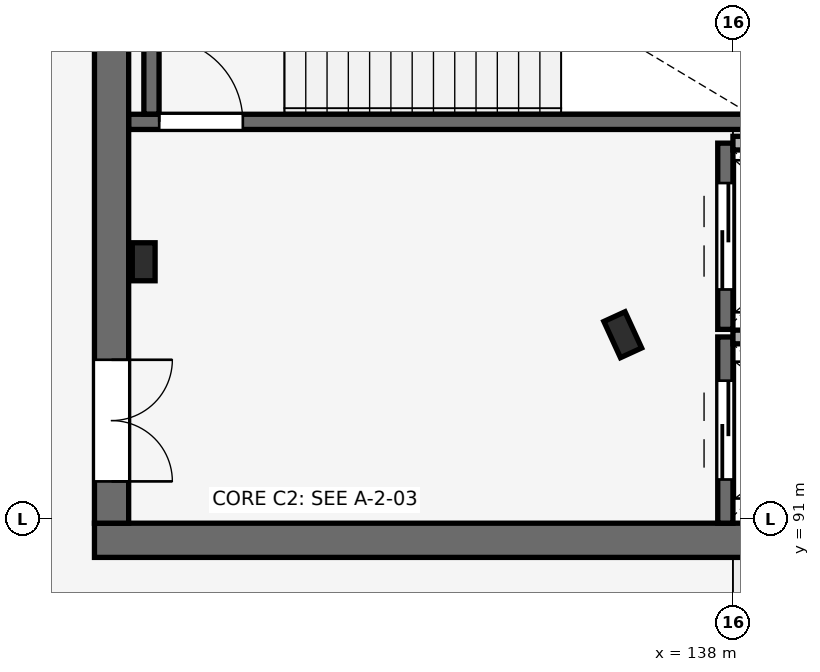
"""IFC4 building model, lengths in metres.
Left out: names, types, materials, properties, quantities, classifications, styles, units other than length and angle.
Written with IfcOpenShell. Run it as: python <this file> out.ifc"""

import sys

from ifc_helpers import new_model, si_unit, direction, frame, frame_2d, origin, origin_2d, place, context, subcontext, project, spatial, rectangle, i_section, extrude, element, fill, save


model = new_model("IFC4")
c1 = context("Model", 3, precision=1e-05, world=origin(), true_north=direction((0.0, 1.0)))
c2 = subcontext(c1, "Body", "Model", "MODEL_VIEW")
j1 = project(units=[si_unit("LENGTHUNIT", "METRE"), si_unit("PLANEANGLEUNIT", "RADIAN")], contexts=[c1])
p1 = place(None, origin())
s1 = spatial("IfcSite", under=j1, at=p1, CompositionType="ELEMENT")
p2 = place(p1, origin())
s2 = spatial("IfcBuilding", under=s1, at=p2, CompositionType="ELEMENT")
p3 = place(p2, frame((0.0, 0.0, 10.2)))
s3 = spatial("IfcBuildingStorey", under=s2, at=p3, CompositionType="ELEMENT", Elevation=10.2)
p4 = place(p3, frame((136.55, 93.43, 0.0), z_axis=(0.0, 0.0, 1.0), x_axis=(0.909018020308, 0.416756810089, 0.0)))
e1 = element("IfcColumn", 1, at=p4, inside=s3, PredefinedType="COLUMN", context=c2, shape_type="SweptSolid", body=[
    extrude(i_section(OverallWidth=0.306, OverallDepth=0.524, WebThickness=0.021, FlangeThickness=0.04, FilletRadius=0.027, at=origin_2d()), origin(), (0.0, 0.0, 1.0), 4.8),
])
p5 = place(p3, frame((129.6, 90.725, 0.0), z_axis=(0.0, 0.0, 1.0), x_axis=(1.0, 0.0, 0.0)))
e2 = element("IfcWall", 2, at=p5, inside=s3, PredefinedType="SHEAR", context=c2, shape_type="SweptSolid", body=[
    extrude(rectangle(XDim=11.4, YDim=0.45, at=frame_2d((5.7, 0.0))), origin(), (0.0, 0.0, 1.0), 4.8),
])
p6 = place(p3, frame((129.825, 90.95, 0.0), z_axis=(0.0, 0.0, 1.0), x_axis=(0.0, 1.0, 0.0)))
e3 = element("IfcWall", 3, at=p6, inside=s3, PredefinedType="SHEAR", context=c2, shape_type="SweptSolid", body=[
    extrude(rectangle(XDim=9.1, YDim=0.45, at=frame_2d((4.55, 0.0))), origin(), (0.0, 0.0, 1.0), 4.8),
])
p7 = place(p6, frame((0.55, 0.0, 0.0)))
e4 = element("IfcOpeningElement", 4, at=p7, cuts=e3, PredefinedType="OPENING", context=c2, shape_type="SweptSolid", body=[
    extrude(rectangle(XDim=1.6, YDim=2.2, at=frame_2d((0.8, 1.1))), frame((0.0, 0.235, 0.0), z_axis=(0.0, -1.0, 0.0), x_axis=(1.0, 0.0, 0.0)), (0.0, 0.0, 1.0), 0.47),
])
p8 = place(p3, frame((130.248, 94.389, 0.0), z_axis=(0.0, 0.0, 1.0), x_axis=(1.0, 0.0, 0.0)))
e5 = element("IfcColumn", 5, at=p8, inside=s3, PredefinedType="COLUMN", context=c2, shape_type="SweptSolid", body=[
    extrude(i_section(OverallWidth=0.3, OverallDepth=0.5, WebThickness=0.014, FlangeThickness=0.028, FilletRadius=0.027, at=origin_2d()), origin(), (0.0, 0.0, 1.0), 4.8),
])
p9 = place(p3, frame((137.9, 90.95, 0.0), z_axis=(0.0, 0.0, 1.0), x_axis=(0.0, 1.0, 0.0)))
e6 = element("IfcWall", 6, at=p9, inside=s3, PredefinedType="SHEAR", context=c2, shape_type="SweptSolid", body=[
    extrude(rectangle(XDim=2.45, YDim=0.2, at=frame_2d((1.225, 0.0))), origin(), (0.0, 0.0, 1.0), 4.52),
])
p10 = place(p9, frame((0.575, 0.0, 0.0)))
e7 = element("IfcOpeningElement", 7, at=p10, cuts=e6, PredefinedType="OPENING", context=c2, shape_type="SweptSolid", body=[
    extrude(rectangle(XDim=1.3, YDim=2.2, at=frame_2d((0.65, 1.1))), frame((0.0, 0.11, 0.0), z_axis=(0.0, -1.0, 0.0), x_axis=(1.0, 0.0, 0.0)), (0.0, 0.0, 1.0), 0.22),
])
p11 = place(p3, frame((138.0, 93.4, 0.0), z_axis=(0.0, 0.0, 1.0), x_axis=(1.0, 0.0, 0.0)))
e8 = element("IfcWall", 8, at=p11, inside=s3, PredefinedType="PARTITIONING", context=c2, shape_type="SweptSolid", body=[
    extrude(rectangle(XDim=2.45, YDim=0.18, at=frame_2d((1.225, 0.0))), origin(), (0.0, 0.0, 1.0), 4.8),
])
p12 = place(p3, frame((137.9, 93.5, 0.0), z_axis=(0.0, 0.0, 1.0), x_axis=(0.0, 1.0, 0.0)))
e9 = element("IfcWall", 9, at=p12, inside=s3, PredefinedType="SHEAR", context=c2, shape_type="SweptSolid", body=[
    extrude(rectangle(XDim=2.45, YDim=0.2, at=frame_2d((1.225, 0.0))), origin(), (0.0, 0.0, 1.0), 4.52),
])
p13 = place(p12, frame((0.525, 0.0, 0.0)))
e10 = element("IfcOpeningElement", 10, at=p13, cuts=e9, PredefinedType="OPENING", context=c2, shape_type="SweptSolid", body=[
    extrude(rectangle(XDim=1.4, YDim=2.2, at=frame_2d((0.7, 1.1))), frame((0.0, 0.11, 0.0), z_axis=(0.0, -1.0, 0.0), x_axis=(1.0, 0.0, 0.0)), (0.0, 0.0, 1.0), 0.22),
])
p14 = place(p3, frame((138.0, 95.95, 0.0), z_axis=(0.0, 0.0, 1.0), x_axis=(1.0, 0.0, 0.0)))
e11 = element("IfcWall", 11, at=p14, inside=s3, PredefinedType="PARTITIONING", context=c2, shape_type="SweptSolid", body=[
    extrude(rectangle(XDim=2.45, YDim=0.18, at=frame_2d((1.225, 0.0))), origin(), (0.0, 0.0, 1.0), 4.8),
])
p15 = place(p3, frame((130.052, 96.23, 0.0), z_axis=(0.0, 0.0, 1.0), x_axis=(1.0, 0.0, 0.0)))
e12 = element("IfcWall", 12, at=p15, inside=s3, PredefinedType="SHEAR", context=c2, shape_type="SweptSolid", body=[
    extrude(rectangle(XDim=8.248, YDim=0.2, at=frame_2d((4.124, 0.0))), origin(), (0.0, 0.0, 1.0), 4.8),
])
p16 = place(p15, frame((0.4, 0.0, 0.0)))
e13 = element("IfcOpeningElement", 13, at=p16, cuts=e12, PredefinedType="OPENING", context=c2, shape_type="SweptSolid", body=[
    extrude(rectangle(XDim=1.1, YDim=2.15, at=frame_2d((0.55, 1.075))), frame((0.0, 0.11, 0.0), z_axis=(0.0, -1.0, 0.0), x_axis=(1.0, 0.0, 0.0)), (0.0, 0.0, 1.0), 0.22),
])
p17 = place(p3, frame((130.35, 96.332, 0.0), z_axis=(0.0, 0.0, 1.0), x_axis=(0.0, 1.0, 0.0)))
e14 = element("IfcWall", 14, at=p17, inside=s3, PredefinedType="SHEAR", context=c2, shape_type="SweptSolid", body=[
    extrude(rectangle(XDim=3.686, YDim=0.2, at=frame_2d((1.843, 0.0))), origin(), (0.0, 0.0, 1.0), 4.8),
])
p18 = place(p10, origin())
e15 = element("IfcDoor", 15, at=p18, inside=s3, OperationType="DOUBLE_DOOR_SLIDING", PredefinedType="DOOR", context=c2, shape_type="SweptSolid", body=[
    extrude(rectangle(XDim=1.3, YDim=2.2, at=frame_2d((0.65, 1.1))), frame((0.0, 0.025, 0.0), z_axis=(0.0, -1.0, 0.0), x_axis=(1.0, 0.0, 0.0)), (0.0, 0.0, 1.0), 0.05),
])
fill(e7, e15)
p19 = place(p13, origin())
e16 = element("IfcDoor", 16, at=p19, inside=s3, OperationType="DOUBLE_DOOR_SLIDING", PredefinedType="DOOR", context=c2, shape_type="SweptSolid", body=[
    extrude(rectangle(XDim=1.4, YDim=2.2, at=frame_2d((0.7, 1.1))), frame((0.0, 0.025, 0.0), z_axis=(0.0, -1.0, 0.0), x_axis=(1.0, 0.0, 0.0)), (0.0, 0.0, 1.0), 0.05),
])
fill(e10, e16)
p20 = place(p16, frame((1.1, 0.0, 0.0), z_axis=(0.0, 0.0, 1.0), x_axis=(-1.0, 0.0, 0.0)))
e17 = element("IfcDoor", 17, at=p20, inside=s3, OperationType="SINGLE_SWING_RIGHT", PredefinedType="DOOR", context=c2, shape_type="SweptSolid", body=[
    extrude(rectangle(XDim=1.1, YDim=2.15, at=frame_2d((0.55, 1.075))), frame((0.0, 0.025, 0.0), z_axis=(0.0, -1.0, 0.0), x_axis=(1.0, 0.0, 0.0)), (0.0, 0.0, 1.0), 0.05),
])
fill(e13, e17)
p21 = place(p7, frame((1.6, 0.0, 0.0), z_axis=(0.0, 0.0, 1.0), x_axis=(-1.0, 0.0, 0.0)))
e18 = element("IfcDoor", 18, at=p21, inside=s3, OperationType="DOUBLE_DOOR_SINGLE_SWING", PredefinedType="DOOR", context=c2, shape_type="SweptSolid", body=[
    extrude(rectangle(XDim=1.6, YDim=2.2, at=frame_2d((0.8, 1.1))), frame((0.0, 0.025, 0.0), z_axis=(0.0, -1.0, 0.0), x_axis=(1.0, 0.0, 0.0)), (0.0, 0.0, 1.0), 0.05),
])
fill(e4, e18)
save(model, sys.argv[1])
